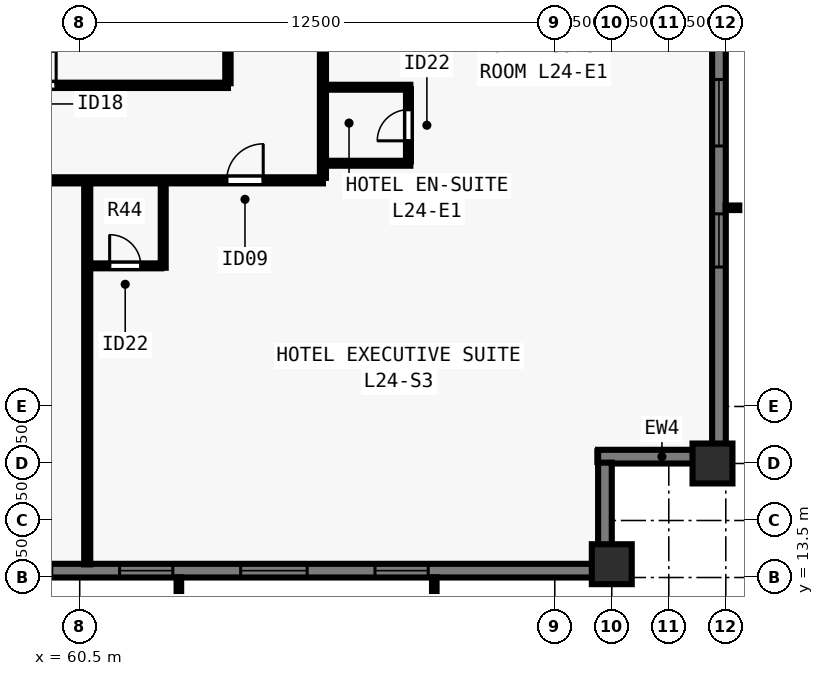
"""IFC4 building model, lengths in metres.
Left out: names, types, materials, properties, quantities, classifications, styles, units other than length and angle.
Written with IfcOpenShell. Run it as: python <this file> out.ifc"""

import sys

from ifc_helpers import new_model, si_unit, direction, frame, frame_2d, origin, origin_2d, place, context, subcontext, project, spatial, rectangle, extrude, element, fill, save


model = new_model("IFC4")
c1 = context("Model", 3, precision=1e-05, world=origin(), true_north=direction((0.0, 1.0)))
c2 = subcontext(c1, "Body", "Model", "MODEL_VIEW")
j1 = project(units=[si_unit("LENGTHUNIT", "METRE"), si_unit("PLANEANGLEUNIT", "RADIAN")], contexts=[c1])
p1 = place(None, origin())
s1 = spatial("IfcSite", under=j1, at=p1, CompositionType="ELEMENT")
p2 = place(p1, origin())
s2 = spatial("IfcBuilding", under=s1, at=p2, CompositionType="ELEMENT")
p3 = place(p2, frame((0.0, 0.0, 90.0)))
s3 = spatial("IfcBuildingStorey", under=s2, at=p3, CompositionType="ELEMENT", Elevation=90.0)
for number, where, z_axis, x_axis in (
    (1, (74.5, 13.85, 0.0), (0.0, 0.0, 1.0), (1.0, 0.0, 0.0)),
    (2, (77.15, 16.5, 0.0), (0.0, 0.0, 1.0), (0.0, 1.0, 0.0)),
):
    element("IfcColumn", number, at=place(p3, frame(where, z_axis=z_axis, x_axis=x_axis)), inside=s3, PredefinedType="COLUMN", context=c2, shape_type="SweptSolid", body=[
        extrude(rectangle(XDim=1.05, YDim=1.05, at=origin_2d()), origin(), (0.0, 0.0, 1.0), 3.5),
    ])
p4 = place(p3, frame((77.32, 61.5, 0.0), z_axis=(0.0, 0.0, 1.0), x_axis=(0.0, -1.0, 0.0)))
e3 = element("IfcWall", 3, at=p4, inside=s3, PredefinedType="SOLIDWALL", context=c2, shape_type="SweptSolid", body=[
    extrude(rectangle(XDim=44.662, YDim=0.36, at=frame_2d((22.331, 0.0))), origin(), (0.0, 0.0, 1.0), 3.28),
])
p5 = place(p4, frame((5.68, 0.0, 0.8)))
e4 = element("IfcOpeningElement", 4, at=p5, cuts=e3, PredefinedType="OPENING", context=c2, shape_type="SweptSolid", body=[
    extrude(rectangle(XDim=1.4, YDim=1.544, at=frame_2d((0.7, 0.772))), frame((0.0, 0.19, 0.0), z_axis=(0.0, -1.0, 0.0), x_axis=(1.0, 0.0, 0.0)), (0.0, 0.0, 1.0), 0.38),
])
p6 = place(p4, frame((8.015, 0.0, 0.8)))
e5 = element("IfcOpeningElement", 5, at=p6, cuts=e3, PredefinedType="OPENING", context=c2, shape_type="SweptSolid", body=[
    extrude(rectangle(XDim=1.75, YDim=1.544, at=frame_2d((0.875, 0.772))), frame((0.0, 0.19, 0.0), z_axis=(0.0, -1.0, 0.0), x_axis=(1.0, 0.0, 0.0)), (0.0, 0.0, 1.0), 0.38),
])
p7 = place(p4, frame((11.551, 0.0, 0.8)))
e6 = element("IfcOpeningElement", 6, at=p7, cuts=e3, PredefinedType="OPENING", context=c2, shape_type="SweptSolid", body=[
    extrude(rectangle(XDim=1.4, YDim=1.544, at=frame_2d((0.7, 0.772))), frame((0.0, 0.19, 0.0), z_axis=(0.0, -1.0, 0.0), x_axis=(1.0, 0.0, 0.0)), (0.0, 0.0, 1.0), 0.38),
])
p8 = place(p4, frame((14.736, 0.0, 0.8)))
e7 = element("IfcOpeningElement", 7, at=p8, cuts=e3, PredefinedType="OPENING", context=c2, shape_type="SweptSolid", body=[
    extrude(rectangle(XDim=1.75, YDim=1.544, at=frame_2d((0.875, 0.772))), frame((0.0, 0.19, 0.0), z_axis=(0.0, -1.0, 0.0), x_axis=(1.0, 0.0, 0.0)), (0.0, 0.0, 1.0), 0.38),
])
p9 = place(p4, frame((19.521, 0.0, 0.8)))
e8 = element("IfcOpeningElement", 8, at=p9, cuts=e3, PredefinedType="OPENING", context=c2, shape_type="SweptSolid", body=[
    extrude(rectangle(XDim=1.4, YDim=1.544, at=frame_2d((0.7, 0.772))), frame((0.0, 0.19, 0.0), z_axis=(0.0, -1.0, 0.0), x_axis=(1.0, 0.0, 0.0)), (0.0, 0.0, 1.0), 0.38),
])
p10 = place(p4, frame((21.456, 0.0, 0.8)))
e9 = element("IfcOpeningElement", 9, at=p10, cuts=e3, PredefinedType="OPENING", context=c2, shape_type="SweptSolid", body=[
    extrude(rectangle(XDim=1.75, YDim=1.544, at=frame_2d((0.875, 0.772))), frame((0.0, 0.19, 0.0), z_axis=(0.0, -1.0, 0.0), x_axis=(1.0, 0.0, 0.0)), (0.0, 0.0, 1.0), 0.38),
])
p11 = place(p4, frame((23.741, 0.0, 0.8)))
e10 = element("IfcOpeningElement", 10, at=p11, cuts=e3, PredefinedType="OPENING", context=c2, shape_type="SweptSolid", body=[
    extrude(rectangle(XDim=1.4, YDim=1.544, at=frame_2d((0.7, 0.772))), frame((0.0, 0.19, 0.0), z_axis=(0.0, -1.0, 0.0), x_axis=(1.0, 0.0, 0.0)), (0.0, 0.0, 1.0), 0.38),
])
p12 = place(p4, frame((28.177, 0.0, 0.8)))
e11 = element("IfcOpeningElement", 11, at=p12, cuts=e3, PredefinedType="OPENING", context=c2, shape_type="SweptSolid", body=[
    extrude(rectangle(XDim=1.75, YDim=1.544, at=frame_2d((0.875, 0.772))), frame((0.0, 0.19, 0.0), z_axis=(0.0, -1.0, 0.0), x_axis=(1.0, 0.0, 0.0)), (0.0, 0.0, 1.0), 0.38),
])
p13 = place(p4, frame((31.711, 0.0, 0.8)))
e12 = element("IfcOpeningElement", 12, at=p13, cuts=e3, PredefinedType="OPENING", context=c2, shape_type="SweptSolid", body=[
    extrude(rectangle(XDim=1.4, YDim=1.544, at=frame_2d((0.7, 0.772))), frame((0.0, 0.19, 0.0), z_axis=(0.0, -1.0, 0.0), x_axis=(1.0, 0.0, 0.0)), (0.0, 0.0, 1.0), 0.38),
])
p14 = place(p4, frame((34.897, 0.0, 0.8)))
e13 = element("IfcOpeningElement", 13, at=p14, cuts=e3, PredefinedType="OPENING", context=c2, shape_type="SweptSolid", body=[
    extrude(rectangle(XDim=1.75, YDim=1.544, at=frame_2d((0.875, 0.772))), frame((0.0, 0.19, 0.0), z_axis=(0.0, -1.0, 0.0), x_axis=(1.0, 0.0, 0.0)), (0.0, 0.0, 1.0), 0.38),
])
p15 = place(p4, frame((38.432, 0.0, 0.8)))
e14 = element("IfcOpeningElement", 14, at=p15, cuts=e3, PredefinedType="OPENING", context=c2, shape_type="SweptSolid", body=[
    extrude(rectangle(XDim=1.4, YDim=1.544, at=frame_2d((0.7, 0.772))), frame((0.0, 0.19, 0.0), z_axis=(0.0, -1.0, 0.0), x_axis=(1.0, 0.0, 0.0)), (0.0, 0.0, 1.0), 0.38),
])
p16 = place(p3, frame((77.5, 16.68, 0.0), z_axis=(0.0, 0.0, 1.0), x_axis=(-1.0, 0.0, 0.0)))
e15 = element("IfcWall", 15, at=p16, inside=s3, PredefinedType="SOLIDWALL", context=c2, shape_type="SweptSolid", body=[
    extrude(rectangle(XDim=3.36, YDim=0.36, at=frame_2d((1.68, 0.0))), origin(), (0.0, 0.0, 1.0), 3.28),
])
p17 = place(p3, frame((74.32, 16.522, 0.0), z_axis=(0.0, 0.0, 1.0), x_axis=(0.0, -1.0, 0.0)))
e16 = element("IfcWall", 16, at=p17, inside=s3, PredefinedType="SOLIDWALL", context=c2, shape_type="SweptSolid", body=[
    extrude(rectangle(XDim=2.684, YDim=0.36, at=frame_2d((1.342, 0.0))), origin(), (0.0, 0.0, 1.0), 3.28),
])
p18 = place(p3, frame((74.5, 13.68, 0.0), z_axis=(0.0, 0.0, 1.0), x_axis=(-1.0, 0.0, 0.0)))
e17 = element("IfcWall", 17, at=p18, inside=s3, PredefinedType="SOLIDWALL", context=c2, shape_type="SweptSolid", body=[
    extrude(rectangle(XDim=44.662, YDim=0.36, at=frame_2d((22.331, 0.0))), origin(), (0.0, 0.0, 1.0), 3.28),
])
p19 = place(p18, frame((4.83, 0.0, 0.8)))
e18 = element("IfcOpeningElement", 18, at=p19, cuts=e17, PredefinedType="OPENING", context=c2, shape_type="SweptSolid", body=[
    extrude(rectangle(XDim=1.4, YDim=1.544, at=frame_2d((0.7, 0.772))), frame((0.0, 0.19, 0.0), z_axis=(0.0, -1.0, 0.0), x_axis=(1.0, 0.0, 0.0)), (0.0, 0.0, 1.0), 0.38),
])
p20 = place(p18, frame((8.015, 0.0, 0.8)))
e19 = element("IfcOpeningElement", 19, at=p20, cuts=e17, PredefinedType="OPENING", context=c2, shape_type="SweptSolid", body=[
    extrude(rectangle(XDim=1.75, YDim=1.544, at=frame_2d((0.875, 0.772))), frame((0.0, 0.19, 0.0), z_axis=(0.0, -1.0, 0.0), x_axis=(1.0, 0.0, 0.0)), (0.0, 0.0, 1.0), 0.38),
])
p21 = place(p18, frame((11.551, 0.0, 0.8)))
e20 = element("IfcOpeningElement", 20, at=p21, cuts=e17, PredefinedType="OPENING", context=c2, shape_type="SweptSolid", body=[
    extrude(rectangle(XDim=1.4, YDim=1.544, at=frame_2d((0.7, 0.772))), frame((0.0, 0.19, 0.0), z_axis=(0.0, -1.0, 0.0), x_axis=(1.0, 0.0, 0.0)), (0.0, 0.0, 1.0), 0.38),
])
p22 = place(p18, frame((14.736, 0.0, 0.8)))
e21 = element("IfcOpeningElement", 21, at=p22, cuts=e17, PredefinedType="OPENING", context=c2, shape_type="SweptSolid", body=[
    extrude(rectangle(XDim=1.75, YDim=1.544, at=frame_2d((0.875, 0.772))), frame((0.0, 0.19, 0.0), z_axis=(0.0, -1.0, 0.0), x_axis=(1.0, 0.0, 0.0)), (0.0, 0.0, 1.0), 0.38),
])
p23 = place(p18, frame((18.721, 0.0, 0.8)))
e22 = element("IfcOpeningElement", 22, at=p23, cuts=e17, PredefinedType="OPENING", context=c2, shape_type="SweptSolid", body=[
    extrude(rectangle(XDim=1.4, YDim=1.544, at=frame_2d((0.7, 0.772))), frame((0.0, 0.19, 0.0), z_axis=(0.0, -1.0, 0.0), x_axis=(1.0, 0.0, 0.0)), (0.0, 0.0, 1.0), 0.38),
])
p24 = place(p18, frame((21.456, 0.0, 0.8)))
e23 = element("IfcOpeningElement", 23, at=p24, cuts=e17, PredefinedType="OPENING", context=c2, shape_type="SweptSolid", body=[
    extrude(rectangle(XDim=1.75, YDim=1.544, at=frame_2d((0.875, 0.772))), frame((0.0, 0.19, 0.0), z_axis=(0.0, -1.0, 0.0), x_axis=(1.0, 0.0, 0.0)), (0.0, 0.0, 1.0), 0.38),
])
p25 = place(p18, frame((24.991, 0.0, 0.8)))
e24 = element("IfcOpeningElement", 24, at=p25, cuts=e17, PredefinedType="OPENING", context=c2, shape_type="SweptSolid", body=[
    extrude(rectangle(XDim=1.4, YDim=1.544, at=frame_2d((0.7, 0.772))), frame((0.0, 0.19, 0.0), z_axis=(0.0, -1.0, 0.0), x_axis=(1.0, 0.0, 0.0)), (0.0, 0.0, 1.0), 0.38),
])
p26 = place(p18, frame((28.177, 0.0, 0.8)))
e25 = element("IfcOpeningElement", 25, at=p26, cuts=e17, PredefinedType="OPENING", context=c2, shape_type="SweptSolid", body=[
    extrude(rectangle(XDim=1.75, YDim=1.544, at=frame_2d((0.875, 0.772))), frame((0.0, 0.19, 0.0), z_axis=(0.0, -1.0, 0.0), x_axis=(1.0, 0.0, 0.0)), (0.0, 0.0, 1.0), 0.38),
])
p27 = place(p18, frame((31.711, 0.0, 0.8)))
e26 = element("IfcOpeningElement", 26, at=p27, cuts=e17, PredefinedType="OPENING", context=c2, shape_type="SweptSolid", body=[
    extrude(rectangle(XDim=1.4, YDim=1.544, at=frame_2d((0.7, 0.772))), frame((0.0, 0.19, 0.0), z_axis=(0.0, -1.0, 0.0), x_axis=(1.0, 0.0, 0.0)), (0.0, 0.0, 1.0), 0.38),
])
p28 = place(p18, frame((34.897, 0.0, 0.8)))
e27 = element("IfcOpeningElement", 27, at=p28, cuts=e17, PredefinedType="OPENING", context=c2, shape_type="SweptSolid", body=[
    extrude(rectangle(XDim=1.75, YDim=1.544, at=frame_2d((0.875, 0.772))), frame((0.0, 0.19, 0.0), z_axis=(0.0, -1.0, 0.0), x_axis=(1.0, 0.0, 0.0)), (0.0, 0.0, 1.0), 0.38),
])
p29 = place(p18, frame((38.432, 0.0, 0.8)))
e28 = element("IfcOpeningElement", 28, at=p29, cuts=e17, PredefinedType="OPENING", context=c2, shape_type="SweptSolid", body=[
    extrude(rectangle(XDim=1.4, YDim=1.544, at=frame_2d((0.7, 0.772))), frame((0.0, 0.19, 0.0), z_axis=(0.0, -1.0, 0.0), x_axis=(1.0, 0.0, 0.0)), (0.0, 0.0, 1.0), 0.38),
])
p30 = place(p3, frame((37.1, 23.95, 0.0), z_axis=(0.0, 0.0, 1.0), x_axis=(1.0, 0.0, 0.0)))
e29 = element("IfcWall", 29, at=p30, inside=s3, PredefinedType="PARTITIONING", context=c2, shape_type="SweptSolid", body=[
    extrude(rectangle(XDim=29.8, YDim=0.16, at=frame_2d((14.9, 0.0))), origin(), (0.0, 0.0, 1.0), 3.28),
])
p31 = place(p30, frame((2.571, 0.0, 0.0)))
e30 = element("IfcOpeningElement", 30, at=p31, cuts=e29, PredefinedType="OPENING", context=c2, shape_type="SweptSolid", body=[
    extrude(rectangle(XDim=0.96, YDim=2.15, at=frame_2d((0.48, 1.075))), frame((0.0, 0.09, 0.0), z_axis=(0.0, -1.0, 0.0), x_axis=(1.0, 0.0, 0.0)), (0.0, 0.0, 1.0), 0.18),
])
p32 = place(p30, frame((15.42, 0.0, 0.0)))
e31 = element("IfcOpeningElement", 31, at=p32, cuts=e29, PredefinedType="OPENING", context=c2, shape_type="SweptSolid", body=[
    extrude(rectangle(XDim=0.96, YDim=2.15, at=frame_2d((0.48, 1.075))), frame((0.0, 0.09, 0.0), z_axis=(0.0, -1.0, 0.0), x_axis=(1.0, 0.0, 0.0)), (0.0, 0.0, 1.0), 0.18),
])
p33 = place(p30, frame((27.269, 0.0, 0.0)))
e32 = element("IfcOpeningElement", 32, at=p33, cuts=e29, PredefinedType="OPENING", context=c2, shape_type="SweptSolid", body=[
    extrude(rectangle(XDim=0.96, YDim=2.15, at=frame_2d((0.48, 1.075))), frame((0.0, 0.09, 0.0), z_axis=(0.0, -1.0, 0.0), x_axis=(1.0, 0.0, 0.0)), (0.0, 0.0, 1.0), 0.18),
])
p34 = place(p3, frame((66.9, 24.015, 0.0), z_axis=(0.0, 0.0, 1.0), x_axis=(0.0, 1.0, 0.0)))
e33 = element("IfcWall", 33, at=p34, inside=s3, PredefinedType="PARTITIONING", context=c2, shape_type="SweptSolid", body=[
    extrude(rectangle(XDim=29.97, YDim=0.16, at=frame_2d((14.985, 0.0))), origin(), (0.0, 0.0, 1.0), 3.28),
])
p35 = place(p34, frame((3.911, 0.0, 0.0)))
e34 = element("IfcOpeningElement", 34, at=p35, cuts=e33, PredefinedType="OPENING", context=c2, shape_type="SweptSolid", body=[
    extrude(rectangle(XDim=0.96, YDim=2.15, at=frame_2d((0.48, 1.075))), frame((0.0, 0.09, 0.0), z_axis=(0.0, -1.0, 0.0), x_axis=(1.0, 0.0, 0.0)), (0.0, 0.0, 1.0), 0.18),
])
p36 = place(p34, frame((9.544, 0.0, 0.0)))
e35 = element("IfcOpeningElement", 35, at=p36, cuts=e33, PredefinedType="OPENING", context=c2, shape_type="SweptSolid", body=[
    extrude(rectangle(XDim=0.96, YDim=2.15, at=frame_2d((0.48, 1.075))), frame((0.0, 0.09, 0.0), z_axis=(0.0, -1.0, 0.0), x_axis=(1.0, 0.0, 0.0)), (0.0, 0.0, 1.0), 0.18),
])
p37 = place(p34, frame((15.625, 0.0, 0.0)))
e36 = element("IfcOpeningElement", 36, at=p37, cuts=e33, PredefinedType="OPENING", context=c2, shape_type="SweptSolid", body=[
    extrude(rectangle(XDim=0.96, YDim=2.15, at=frame_2d((0.48, 1.075))), frame((0.0, 0.09, 0.0), z_axis=(0.0, -1.0, 0.0), x_axis=(1.0, 0.0, 0.0)), (0.0, 0.0, 1.0), 0.18),
])
p38 = place(p34, frame((21.584, 0.0, 0.0)))
e37 = element("IfcOpeningElement", 37, at=p38, cuts=e33, PredefinedType="OPENING", context=c2, shape_type="SweptSolid", body=[
    extrude(rectangle(XDim=0.96, YDim=2.15, at=frame_2d((0.48, 1.075))), frame((0.0, 0.09, 0.0), z_axis=(0.0, -1.0, 0.0), x_axis=(1.0, 0.0, 0.0)), (0.0, 0.0, 1.0), 0.18),
])
p39 = place(p34, frame((27.494, 0.0, 0.0)))
e38 = element("IfcOpeningElement", 38, at=p39, cuts=e33, PredefinedType="OPENING", context=c2, shape_type="SweptSolid", body=[
    extrude(rectangle(XDim=0.96, YDim=2.15, at=frame_2d((0.48, 1.075))), frame((0.0, 0.09, 0.0), z_axis=(0.0, -1.0, 0.0), x_axis=(1.0, 0.0, 0.0)), (0.0, 0.0, 1.0), 0.18),
])
p40 = place(p3, frame((39.6, 26.45, 0.0), z_axis=(0.0, 0.0, 1.0), x_axis=(1.0, 0.0, 0.0)))
e39 = element("IfcWall", 39, at=p40, inside=s3, PredefinedType="PARTITIONING", context=c2, shape_type="SweptSolid", body=[
    extrude(rectangle(XDim=24.8, YDim=0.14, at=frame_2d((12.4, 0.0))), origin(), (0.0, 0.0, 1.0), 3.28),
])
p41 = place(p40, frame((1.2, 0.0, 0.0)))
e40 = element("IfcOpeningElement", 40, at=p41, cuts=e39, PredefinedType="OPENING", context=c2, shape_type="SweptSolid", body=[
    extrude(rectangle(XDim=0.88, YDim=2.1, at=frame_2d((0.44, 1.05))), frame((0.0, 0.08, 0.0), z_axis=(0.0, -1.0, 0.0), x_axis=(1.0, 0.0, 0.0)), (0.0, 0.0, 1.0), 0.16),
])
p42 = place(p40, frame((8.9, 0.0, 0.0)))
e41 = element("IfcOpeningElement", 41, at=p42, cuts=e39, PredefinedType="OPENING", context=c2, shape_type="SweptSolid", body=[
    extrude(rectangle(XDim=0.88, YDim=2.1, at=frame_2d((0.44, 1.05))), frame((0.0, 0.08, 0.0), z_axis=(0.0, -1.0, 0.0), x_axis=(1.0, 0.0, 0.0)), (0.0, 0.0, 1.0), 0.16),
])
p43 = place(p40, frame((19.4, 0.0, 0.0)))
e42 = element("IfcOpeningElement", 42, at=p43, cuts=e39, PredefinedType="OPENING", context=c2, shape_type="SweptSolid", body=[
    extrude(rectangle(XDim=0.88, YDim=2.1, at=frame_2d((0.44, 1.05))), frame((0.0, 0.08, 0.0), z_axis=(0.0, -1.0, 0.0), x_axis=(1.0, 0.0, 0.0)), (0.0, 0.0, 1.0), 0.16),
])
p44 = place(p3, frame((64.4, 26.505, 0.0), z_axis=(0.0, 0.0, 1.0), x_axis=(0.0, 1.0, 0.0)))
e43 = element("IfcWall", 43, at=p44, inside=s3, PredefinedType="PARTITIONING", context=c2, shape_type="SweptSolid", body=[
    extrude(rectangle(XDim=12.245, YDim=0.14, at=frame_2d((6.123, 0.0))), origin(), (0.0, 0.0, 1.0), 3.28),
])
p45 = place(p44, frame((2.445, 0.0, 0.0)))
e44 = element("IfcOpeningElement", 44, at=p45, cuts=e43, PredefinedType="OPENING", context=c2, shape_type="SweptSolid", body=[
    extrude(rectangle(XDim=0.88, YDim=2.1, at=frame_2d((0.44, 1.05))), frame((0.0, 0.08, 0.0), z_axis=(0.0, -1.0, 0.0), x_axis=(1.0, 0.0, 0.0)), (0.0, 0.0, 1.0), 0.16),
])
p46 = place(p3, frame((60.698, 13.845, 0.0), z_axis=(0.0, 0.0, 1.0), x_axis=(0.0, 1.0, 0.0)))
e45 = element("IfcWall", 45, at=p46, inside=s3, PredefinedType="PARTITIONING", context=c2, shape_type="SweptSolid", body=[
    extrude(rectangle(XDim=10.04, YDim=0.16, at=frame_2d((5.02, 0.0))), origin(), (0.0, 0.0, 1.0), 3.28),
])
p47 = place(p3, frame((62.698, 21.65, 0.0), z_axis=(0.0, 0.0, 1.0), x_axis=(0.0, 1.0, 0.0)))
e46 = element("IfcWall", 46, at=p47, inside=s3, PredefinedType="PLUMBINGWALL", context=c2, shape_type="SweptSolid", body=[
    extrude(rectangle(XDim=2.235, YDim=0.13, at=frame_2d((1.118, 0.0))), origin(), (0.0, 0.0, 1.0), 3.28),
])
p48 = place(p3, frame((60.762, 21.7, 0.0), z_axis=(0.0, 0.0, 1.0), x_axis=(1.0, 0.0, 0.0)))
e47 = element("IfcWall", 47, at=p48, inside=s3, PredefinedType="PLUMBINGWALL", context=c2, shape_type="SweptSolid", body=[
    extrude(rectangle(XDim=1.885, YDim=0.13, at=frame_2d((0.942, 0.0))), origin(), (0.0, 0.0, 1.0), 3.28),
])
p49 = place(p48, frame((0.525, 0.0, 0.0)))
e48 = element("IfcOpeningElement", 48, at=p49, cuts=e47, PredefinedType="OPENING", context=c2, shape_type="SweptSolid", body=[
    extrude(rectangle(XDim=0.82, YDim=2.1, at=frame_2d((0.41, 1.05))), frame((0.0, 0.075, 0.0), z_axis=(0.0, -1.0, 0.0), x_axis=(1.0, 0.0, 0.0)), (0.0, 0.0, 1.0), 0.15),
])
p50 = place(p3, frame((66.965, 24.4, 0.0), z_axis=(0.0, 0.0, 1.0), x_axis=(1.0, 0.0, 0.0)))
e49 = element("IfcWall", 49, at=p50, inside=s3, PredefinedType="PLUMBINGWALL", context=c2, shape_type="SweptSolid", body=[
    extrude(rectangle(XDim=2.235, YDim=0.13, at=frame_2d((1.117, 0.0))), origin(), (0.0, 0.0, 1.0), 2.849),
])
p51 = place(p3, frame((66.965, 26.4, 0.0), z_axis=(0.0, 0.0, 1.0), x_axis=(1.0, 0.0, 0.0)))
e50 = element("IfcWall", 50, at=p51, inside=s3, PredefinedType="PLUMBINGWALL", context=c2, shape_type="SweptSolid", body=[
    extrude(rectangle(XDim=2.235, YDim=0.13, at=frame_2d((1.117, 0.0))), origin(), (0.0, 0.0, 1.0), 3.28),
])
p52 = place(p3, frame((69.15, 24.45, 0.0), z_axis=(0.0, 0.0, 1.0), x_axis=(0.0, 1.0, 0.0)))
e51 = element("IfcWall", 51, at=p52, inside=s3, PredefinedType="PLUMBINGWALL", context=c2, shape_type="SweptSolid", body=[
    extrude(rectangle(XDim=1.9, YDim=0.13, at=frame_2d((0.95, 0.0))), origin(), (0.0, 0.0, 1.0), 3.28),
])
p53 = place(p52, frame((0.54, 0.0, 0.0)))
e52 = element("IfcOpeningElement", 52, at=p53, cuts=e51, PredefinedType="OPENING", context=c2, shape_type="SweptSolid", body=[
    extrude(rectangle(XDim=0.82, YDim=2.1, at=frame_2d((0.41, 1.05))), frame((0.0, 0.075, 0.0), z_axis=(0.0, -1.0, 0.0), x_axis=(1.0, 0.0, 0.0)), (0.0, 0.0, 1.0), 0.15),
])
p54 = place(p14, origin())
e53 = element("IfcWindow", 53, at=p54, inside=s3, PartitioningType="SINGLE_PANEL", PredefinedType="WINDOW", context=c2, shape_type="SweptSolid", body=[
    extrude(rectangle(XDim=1.75, YDim=1.544, at=frame_2d((0.875, 0.772))), frame((0.0, -0.05, 0.0), z_axis=(0.0, -1.0, 0.0), x_axis=(1.0, 0.0, 0.0)), (0.0, 0.0, 1.0), 0.06),
])
fill(e13, e53)
p55 = place(p15, origin())
e54 = element("IfcWindow", 54, at=p55, inside=s3, PartitioningType="SINGLE_PANEL", PredefinedType="WINDOW", context=c2, shape_type="SweptSolid", body=[
    extrude(rectangle(XDim=1.4, YDim=1.544, at=frame_2d((0.7, 0.772))), frame((0.0, -0.05, 0.0), z_axis=(0.0, -1.0, 0.0), x_axis=(1.0, 0.0, 0.0)), (0.0, 0.0, 1.0), 0.06),
])
fill(e14, e54)
p56 = place(p19, origin())
e55 = element("IfcWindow", 55, at=p56, inside=s3, PartitioningType="SINGLE_PANEL", PredefinedType="WINDOW", context=c2, shape_type="SweptSolid", body=[
    extrude(rectangle(XDim=1.4, YDim=1.544, at=frame_2d((0.7, 0.772))), frame((0.0, -0.05, 0.0), z_axis=(0.0, -1.0, 0.0), x_axis=(1.0, 0.0, 0.0)), (0.0, 0.0, 1.0), 0.06),
])
fill(e18, e55)
p57 = place(p20, origin())
e56 = element("IfcWindow", 56, at=p57, inside=s3, PartitioningType="SINGLE_PANEL", PredefinedType="WINDOW", context=c2, shape_type="SweptSolid", body=[
    extrude(rectangle(XDim=1.75, YDim=1.544, at=frame_2d((0.875, 0.772))), frame((0.0, -0.05, 0.0), z_axis=(0.0, -1.0, 0.0), x_axis=(1.0, 0.0, 0.0)), (0.0, 0.0, 1.0), 0.06),
])
fill(e19, e56)
p58 = place(p21, origin())
e57 = element("IfcWindow", 57, at=p58, inside=s3, PartitioningType="SINGLE_PANEL", PredefinedType="WINDOW", context=c2, shape_type="SweptSolid", body=[
    extrude(rectangle(XDim=1.4, YDim=1.544, at=frame_2d((0.7, 0.772))), frame((0.0, -0.05, 0.0), z_axis=(0.0, -1.0, 0.0), x_axis=(1.0, 0.0, 0.0)), (0.0, 0.0, 1.0), 0.06),
])
fill(e20, e57)
p59 = place(p43, origin())
e58 = element("IfcDoor", 58, at=p59, inside=s3, OperationType="SINGLE_SWING_RIGHT", PredefinedType="DOOR", context=c2, shape_type="SweptSolid", body=[
    extrude(rectangle(XDim=0.88, YDim=2.1, at=frame_2d((0.44, 1.05))), frame((0.0, 0.025, 0.0), z_axis=(0.0, -1.0, 0.0), x_axis=(1.0, 0.0, 0.0)), (0.0, 0.0, 1.0), 0.05),
])
fill(e42, e58)
p60 = place(p49, origin())
e59 = element("IfcDoor", 59, at=p60, inside=s3, OperationType="SINGLE_SWING_LEFT", PredefinedType="DOOR", context=c2, shape_type="SweptSolid", body=[
    extrude(rectangle(XDim=0.82, YDim=2.1, at=frame_2d((0.41, 1.05))), frame((0.0, 0.025, 0.0), z_axis=(0.0, -1.0, 0.0), x_axis=(1.0, 0.0, 0.0)), (0.0, 0.0, 1.0), 0.05),
])
fill(e48, e59)
p61 = place(p33, origin())
e60 = element("IfcDoor", 60, at=p61, inside=s3, OperationType="SINGLE_SWING_RIGHT", PredefinedType="DOOR", context=c2, shape_type="SweptSolid", body=[
    extrude(rectangle(XDim=0.96, YDim=2.15, at=frame_2d((0.48, 1.075))), frame((0.0, 0.025, 0.0), z_axis=(0.0, -1.0, 0.0), x_axis=(1.0, 0.0, 0.0)), (0.0, 0.0, 1.0), 0.05),
])
fill(e32, e60)
p62 = place(p53, origin())
e61 = element("IfcDoor", 61, at=p62, inside=s3, OperationType="SINGLE_SWING_LEFT", PredefinedType="DOOR", context=c2, shape_type="SweptSolid", body=[
    extrude(rectangle(XDim=0.82, YDim=2.1, at=frame_2d((0.41, 1.05))), frame((0.0, 0.025, 0.0), z_axis=(0.0, -1.0, 0.0), x_axis=(1.0, 0.0, 0.0)), (0.0, 0.0, 1.0), 0.05),
])
fill(e52, e61)
save(model, sys.argv[1])
